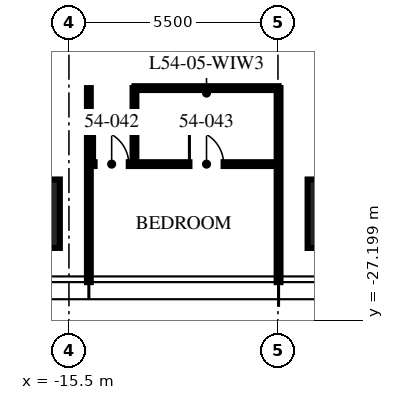
"""IFC4 building model, lengths in metres.
Left out: names, types, materials, properties, quantities, classifications, styles, units other than length and angle.
Written with IfcOpenShell. Run it as: python <this file> out.ifc"""

import sys

from ifc_helpers import new_model, si_unit, direction, frame, frame_2d, origin, origin_2d, place, context, subcontext, project, spatial, rectangle, extrude, element, fill, save


model = new_model("IFC4")
c1 = context("Model", 3, precision=1e-05, world=origin(), true_north=direction((0.0, 1.0)))
c2 = subcontext(c1, "Body", "Model", "MODEL_VIEW")
j1 = project(units=[si_unit("LENGTHUNIT", "METRE"), si_unit("PLANEANGLEUNIT", "RADIAN")], contexts=[c1])
p1 = place(None, origin())
s1 = spatial("IfcSite", under=j1, at=p1, CompositionType="ELEMENT")
p2 = place(p1, origin())
s2 = spatial("IfcBuilding", under=s1, at=p2, CompositionType="ELEMENT")
p3 = place(p2, frame((0.0, 0.0, 218.25)))
s3 = spatial("IfcBuildingStorey", under=s2, at=p3, CompositionType="ELEMENT", Elevation=218.25)
for number, where, z_axis, x_axis in (
    (1, (-8.32, -24.4, 0.0), (0.0, 0.0, 1.0), (1.0, 0.0, 0.0)),
    (2, (-16.64, -24.4, 0.0), (0.0, 0.0, 1.0), (1.0, 0.0, 0.0)),
):
    element("IfcColumn", number, at=place(p3, frame(where, z_axis=z_axis, x_axis=x_axis)), inside=s3, PredefinedType="COLUMN", context=c2, shape_type="SweptSolid", body=[
        extrude(rectangle(XDim=1.8, YDim=1.8, at=origin_2d()), origin(), (0.0, 0.0, 1.0), 3.75),
    ])
for number, where, z_axis, x_axis in (
    (3, (-14.976, -21.095, 0.0), (0.0, 0.0, 1.0), (0.0, -1.0, 0.0)),
    (4, (-9.984, -21.095, 0.0), (0.0, 0.0, 1.0), (0.0, -1.0, 0.0)),
):
    element("IfcWall", number, at=place(p3, frame(where, z_axis=z_axis, x_axis=x_axis)), inside=s3, PredefinedType="PARTITIONING", context=c2, shape_type="SweptSolid", body=[
        extrude(rectangle(XDim=5.105, YDim=0.1, at=frame_2d((2.552, 0.0))), origin(), (0.0, 0.0, 1.0), 2.91),
    ])
p4 = place(p3, frame((-14.976, -23.095, 0.0), z_axis=(0.0, 0.0, 1.0), x_axis=(1.0, 0.0, 0.0)))
e5 = element("IfcWall", 5, at=p4, inside=s3, PredefinedType="PARTITIONING", context=c2, shape_type="SweptSolid", body=[
    extrude(rectangle(XDim=4.992, YDim=0.1, at=frame_2d((2.496, 0.0))), origin(), (0.0, 0.0, 1.0), 2.81),
])
p5 = place(p4, frame((0.15, 0.0, 0.0)))
e6 = element("IfcOpeningElement", 6, at=p5, cuts=e5, PredefinedType="OPENING", context=c2, shape_type="SweptSolid", body=[
    extrude(rectangle(XDim=0.9, YDim=2.1, at=frame_2d((0.45, 1.05))), frame((0.0, 0.06, 0.0), z_axis=(0.0, -1.0, 0.0), x_axis=(1.0, 0.0, 0.0)), (0.0, 0.0, 1.0), 0.12),
])
p6 = place(p4, frame((2.646, 0.0, 0.0)))
e7 = element("IfcOpeningElement", 7, at=p6, cuts=e5, PredefinedType="OPENING", context=c2, shape_type="SweptSolid", body=[
    extrude(rectangle(XDim=0.9, YDim=2.1, at=frame_2d((0.45, 1.05))), frame((0.0, 0.06, 0.0), z_axis=(0.0, -1.0, 0.0), x_axis=(1.0, 0.0, 0.0)), (0.0, 0.0, 1.0), 0.12),
])
p7 = place(p3, frame((-13.776, -21.095, 0.0), z_axis=(0.0, 0.0, 1.0), x_axis=(0.0, -1.0, 0.0)))
e8 = element("IfcWall", 8, at=p7, inside=s3, PredefinedType="PARTITIONING", context=c2, shape_type="SweptSolid", body=[
    extrude(rectangle(XDim=2.0, YDim=0.1, at=frame_2d((1.0, 0.0))), origin(), (0.0, 0.0, 1.0), 3.5),
])
p8 = place(p3, frame((-13.776, -21.095, 0.0), z_axis=(0.0, 0.0, 1.0), x_axis=(1.0, 0.0, 0.0)))
e9 = element("IfcWall", 9, at=p8, inside=s3, PredefinedType="PARTITIONING", context=c2, shape_type="SweptSolid", body=[
    extrude(rectangle(XDim=3.792, YDim=0.1, at=frame_2d((1.896, 0.0))), origin(), (0.0, 0.0, 1.0), 2.81),
])
p9 = place(p5, origin())
e10 = element("IfcDoor", 10, at=p9, inside=s3, OperationType="SINGLE_SWING_LEFT", PredefinedType="DOOR", context=c2, shape_type="SweptSolid", body=[
    extrude(rectangle(XDim=0.9, YDim=2.1, at=frame_2d((0.45, 1.05))), frame((0.0, 0.025, 0.0), z_axis=(0.0, -1.0, 0.0), x_axis=(1.0, 0.0, 0.0)), (0.0, 0.0, 1.0), 0.05),
])
fill(e6, e10)
p10 = place(p6, origin())
e11 = element("IfcDoor", 11, at=p10, inside=s3, OperationType="SINGLE_SWING_LEFT", PredefinedType="DOOR", context=c2, shape_type="SweptSolid", body=[
    extrude(rectangle(XDim=0.9, YDim=2.1, at=frame_2d((0.45, 1.05))), frame((0.0, 0.025, 0.0), z_axis=(0.0, -1.0, 0.0), x_axis=(1.0, 0.0, 0.0)), (0.0, 0.0, 1.0), 0.05),
])
fill(e7, e11)
save(model, sys.argv[1])
